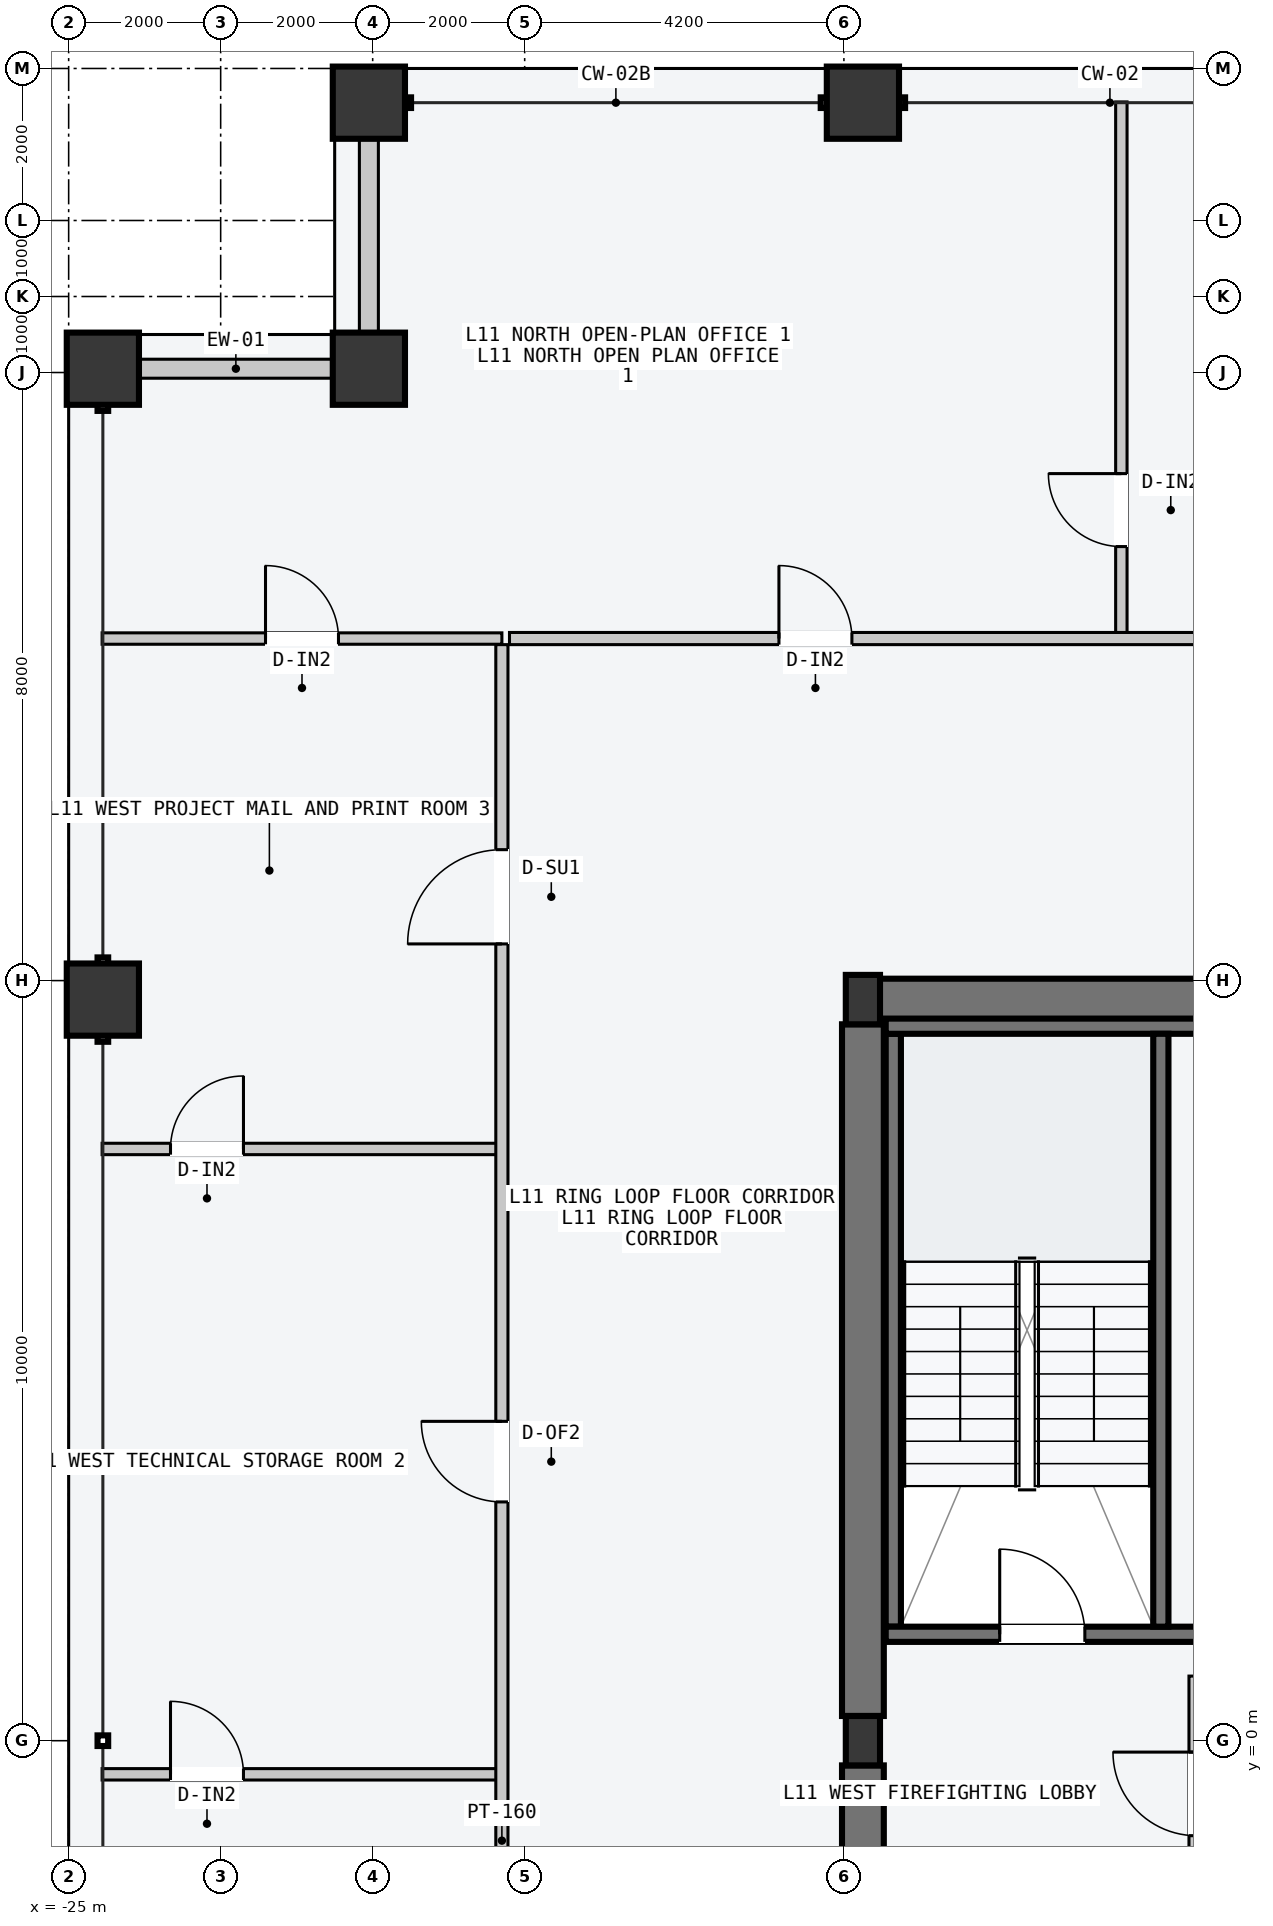
"""IFC4 building model, lengths in metres.
Left out: names, types, materials, properties, quantities, classifications, styles, units other than length and angle.
Written with IfcOpenShell. Run it as: python <this file> out.ifc"""

import sys

from ifc_helpers import new_model, si_unit, direction, frame, frame_2d, origin, origin_2d, place, context, subcontext, project, spatial, rectangle, hollow_rectangle, i_section, extrude, element, fill, save


model = new_model("IFC4")
c1 = context("Model", 3, precision=1e-05, world=origin(), true_north=direction((0.0, 1.0)))
c2 = subcontext(c1, "Body", "Model", "MODEL_VIEW")
j1 = project(units=[si_unit("LENGTHUNIT", "METRE"), si_unit("PLANEANGLEUNIT", "RADIAN")], contexts=[c1])
p1 = place(None, origin())
s1 = spatial("IfcSite", under=j1, at=p1, CompositionType="ELEMENT")
p2 = place(p1, origin())
s2 = spatial("IfcBuilding", under=s1, at=p2, CompositionType="ELEMENT")
p3 = place(p2, frame((0.0, 0.0, 45.6)))
s3 = spatial("IfcBuildingStorey", under=s2, at=p3, CompositionType="ELEMENT", Elevation=45.6)
p4 = place(p3, frame((-14.53, 9.75, -0.2), z_axis=(0.0, 0.0, 1.0), x_axis=(1.0, 0.0, 0.0)))
e1 = element("IfcWall", 1, at=p4, inside=s3, PredefinedType="SHEAR", context=c2, shape_type="SweptSolid", body=[
    extrude(rectangle(XDim=6.46, YDim=0.55, at=frame_2d((3.23, 0.0))), origin(), (0.0, 0.0, 1.0), 3.6),
])
for number, where, z_axis, x_axis in (
    (2, (-14.55, -9.425, -0.2), (0.0, 0.0, 1.0), (0.0, 1.0, 0.0)),
    (3, (-14.55, 0.325, -0.2), (0.0, 0.0, 1.0), (0.0, 1.0, 0.0)),
):
    element("IfcWall", number, at=place(p3, frame(where, z_axis=z_axis, x_axis=x_axis)), inside=s3, PredefinedType="SHEAR", context=c2, shape_type="SweptSolid", body=[
        extrude(rectangle(XDim=9.1, YDim=0.55, at=frame_2d((4.55, 0.0))), origin(), (0.0, 0.0, 1.0), 3.6),
    ])
p5 = place(p3, frame((-14.15, 1.5, -0.2), z_axis=(0.0, 0.0, 1.0), x_axis=(0.0, 1.0, 0.0)))
e4 = element("IfcWall", 4, at=p5, inside=s3, PredefinedType="SOLIDWALL", context=c2, shape_type="SweptSolid", body=[
    extrude(rectangle(XDim=7.8, YDim=0.2, at=frame_2d((3.9, 0.0))), origin(), (0.0, 0.0, 1.0), 3.6),
])
p6 = place(p3, frame((-14.25, 1.4, -0.2), z_axis=(0.0, 0.0, 1.0), x_axis=(1.0, 0.0, 0.0)))
e5 = element("IfcWall", 5, at=p6, inside=s3, PredefinedType="SOLIDWALL", context=c2, shape_type="SweptSolid", body=[
    extrude(rectangle(XDim=4.1, YDim=0.2, at=frame_2d((2.05, 0.0))), origin(), (0.0, 0.0, 1.0), 3.6),
])
p7 = place(p6, frame((1.5, 0.0, 0.2)))
e6 = element("IfcOpeningElement", 6, at=p7, cuts=e5, PredefinedType="OPENING", context=c2, shape_type="SweptSolid", body=[
    extrude(rectangle(XDim=1.12, YDim=2.18, at=frame_2d((0.56, 1.09))), frame((0.0, 0.11, 0.0), z_axis=(0.0, -1.0, 0.0), x_axis=(1.0, 0.0, 0.0)), (0.0, 0.0, 1.0), 0.22),
])
p8 = place(p3, frame((-14.25, 9.4, -0.2), z_axis=(0.0, 0.0, 1.0), x_axis=(1.0, 0.0, 0.0)))
e7 = element("IfcWall", 7, at=p8, inside=s3, PredefinedType="SOLIDWALL", context=c2, shape_type="SweptSolid", body=[
    extrude(rectangle(XDim=4.1, YDim=0.2, at=frame_2d((2.05, 0.0))), origin(), (0.0, 0.0, 1.0), 3.6),
])
p9 = place(p3, frame((-10.63, 1.5, -0.2), z_axis=(0.0, 0.0, 1.0), x_axis=(0.0, 1.0, 0.0)))
e8 = element("IfcWall", 8, at=p9, inside=s3, PredefinedType="SOLIDWALL", context=c2, shape_type="SweptSolid", body=[
    extrude(rectangle(XDim=7.8, YDim=0.2, at=frame_2d((3.9, 0.0))), origin(), (0.0, 0.0, 1.0), 3.6),
])
for number, where, z_axis, x_axis in (
    (9, (-14.55, 0.0, 0.0), (0.0, 0.0, 1.0), (1.0, 0.0, 0.0)),
    (10, (-14.55, 9.75, 0.0), (0.0, 0.0, 1.0), (1.0, 0.0, 0.0)),
):
    element("IfcColumn", number, at=place(p3, frame(where, z_axis=z_axis, x_axis=x_axis)), inside=s3, PredefinedType="COLUMN", context=c2, shape_type="SweptSolid", body=[
        extrude(i_section(OverallWidth=0.45, OverallDepth=0.65, WebThickness=0.025, FlangeThickness=0.04, at=origin_2d()), origin(), (0.0, 0.0, 1.0), 3.6),
    ])
for number, where, z_axis, x_axis in (
    (11, (-21.05, 21.55, 0.0), (0.0, 0.0, 1.0), (1.0, 0.0, 0.0)),
    (12, (-14.55, 21.55, 0.0), (0.0, 0.0, 1.0), (1.0, 0.0, 0.0)),
    (13, (-24.55, 9.75, 0.0), (0.0, 0.0, 1.0), (0.0, 1.0, 0.0)),
    (14, (-24.55, 18.05, 0.0), (0.0, 0.0, 1.0), (0.0, 1.0, 0.0)),
    (15, (-21.05, 18.05, 0.0), (0.0, 0.0, 1.0), (1.0, 0.0, 0.0)),
):
    element("IfcColumn", number, at=place(p3, frame(where, z_axis=z_axis, x_axis=x_axis)), inside=s3, PredefinedType="COLUMN", context=c2, shape_type="SweptSolid", body=[
        extrude(hollow_rectangle(XDim=0.95, YDim=0.95, WallThickness=0.048, at=origin_2d()), origin(), (0.0, 0.0, 1.0), 3.6),
    ])
for number, where, z_axis, x_axis in (
    (16, (-24.065, 18.05, 0.0), (0.0, 0.0, 1.0), (1.0, 0.0, 0.0)),
    (17, (-21.05, 18.535, 0.0), (0.0, 0.0, 1.0), (0.0, 1.0, 0.0)),
):
    element("IfcWall", number, at=place(p3, frame(where, z_axis=z_axis, x_axis=x_axis)), inside=s3, PredefinedType="STANDARD", context=c2, shape_type="SweptSolid", body=[
        extrude(rectangle(XDim=2.53, YDim=0.25, at=frame_2d((1.265, 0.0))), origin(), (0.0, 0.0, 1.0), 2.7),
    ])
p10 = place(p3, frame((-10.16, -2.55, 0.0), z_axis=(0.0, 0.0, 1.0), x_axis=(0.0, 1.0, 0.0)))
e18 = element("IfcWall", 18, at=p10, inside=s3, PredefinedType="PARTITIONING", context=c2, shape_type="SweptSolid", body=[
    extrude(rectangle(XDim=3.4, YDim=0.2, at=frame_2d((1.7, 0.0))), origin(), (0.0, 0.0, 1.0), 3.4),
])
p11 = place(p10, frame((1.3, 0.0, 0.0)))
e19 = element("IfcOpeningElement", 19, at=p11, cuts=e18, PredefinedType="OPENING", context=c2, shape_type="SweptSolid", body=[
    extrude(rectangle(XDim=1.1, YDim=2.15, at=frame_2d((0.55, 1.075))), frame((0.0, 0.11, 0.0), z_axis=(0.0, -1.0, 0.0), x_axis=(1.0, 0.0, 0.0)), (0.0, 0.0, 1.0), 0.22),
])
p12 = place(p3, frame((-11.15, 14.56, 0.0), z_axis=(0.0, 0.0, 1.0), x_axis=(0.0, 1.0, 0.0)))
e20 = element("IfcWall", 20, at=p12, inside=s3, PredefinedType="PARTITIONING", context=c2, shape_type="SweptSolid", body=[
    extrude(rectangle(XDim=7.0, YDim=0.15, at=frame_2d((3.5, 0.0))), origin(), (0.0, 0.0, 1.0), 3.4),
])
p13 = place(p12, frame((1.15, 0.0, 0.0)))
e21 = element("IfcOpeningElement", 21, at=p13, cuts=e20, PredefinedType="OPENING", context=c2, shape_type="SweptSolid", body=[
    extrude(rectangle(XDim=0.96, YDim=2.18, at=frame_2d((0.48, 1.09))), frame((0.0, 0.085, 0.0), z_axis=(0.0, -1.0, 0.0), x_axis=(1.0, 0.0, 0.0)), (0.0, 0.0, 1.0), 0.17),
])
p14 = place(p3, frame((-19.2, 14.5, 0.0), z_axis=(0.0, 0.0, 1.0), x_axis=(1.0, 0.0, 0.0)))
e22 = element("IfcWall", 22, at=p14, inside=s3, PredefinedType="PARTITIONING", context=c2, shape_type="SweptSolid", body=[
    extrude(rectangle(XDim=38.4, YDim=0.16, at=frame_2d((19.2, 0.0))), origin(), (0.0, 0.0, 1.0), 3.4),
])
p15 = place(p14, frame((3.545, 0.0, 0.0)))
e23 = element("IfcOpeningElement", 23, at=p15, cuts=e22, PredefinedType="OPENING", context=c2, shape_type="SweptSolid", body=[
    extrude(rectangle(XDim=0.96, YDim=2.18, at=frame_2d((0.48, 1.09))), frame((0.0, 0.09, 0.0), z_axis=(0.0, -1.0, 0.0), x_axis=(1.0, 0.0, 0.0)), (0.0, 0.0, 1.0), 0.18),
])
p16 = place(p14, frame((14.111, 0.0, 0.0)))
e24 = element("IfcOpeningElement", 24, at=p16, cuts=e22, PredefinedType="OPENING", context=c2, shape_type="SweptSolid", body=[
    extrude(rectangle(XDim=1.02, YDim=2.2, at=frame_2d((0.51, 1.1))), frame((0.0, 0.09, 0.0), z_axis=(0.0, -1.0, 0.0), x_axis=(1.0, 0.0, 0.0)), (0.0, 0.0, 1.0), 0.18),
])
p17 = place(p14, frame((24.631, 0.0, 0.0)))
e25 = element("IfcOpeningElement", 25, at=p17, cuts=e22, PredefinedType="OPENING", context=c2, shape_type="SweptSolid", body=[
    extrude(rectangle(XDim=1.06, YDim=2.2, at=frame_2d((0.53, 1.1))), frame((0.0, 0.09, 0.0), z_axis=(0.0, -1.0, 0.0), x_axis=(1.0, 0.0, 0.0)), (0.0, 0.0, 1.0), 0.18),
])
p18 = place(p14, frame((33.145, 0.0, 0.0)))
e26 = element("IfcOpeningElement", 26, at=p18, cuts=e22, PredefinedType="OPENING", context=c2, shape_type="SweptSolid", body=[
    extrude(rectangle(XDim=1.24, YDim=2.24, at=frame_2d((0.62, 1.12))), frame((0.0, 0.09, 0.0), z_axis=(0.0, -1.0, 0.0), x_axis=(1.0, 0.0, 0.0)), (0.0, 0.0, 1.0), 0.18),
])
p19 = place(p3, frame((-24.56, 14.5, 0.0), z_axis=(0.0, 0.0, 1.0), x_axis=(1.0, 0.0, 0.0)))
e27 = element("IfcWall", 27, at=p19, inside=s3, PredefinedType="PARTITIONING", context=c2, shape_type="SweptSolid", body=[
    extrude(rectangle(XDim=5.26, YDim=0.15, at=frame_2d((2.63, 0.0))), origin(), (0.0, 0.0, 1.0), 3.4),
])
p20 = place(p19, frame((2.15, 0.0, 0.0)))
e28 = element("IfcOpeningElement", 28, at=p20, cuts=e27, PredefinedType="OPENING", context=c2, shape_type="SweptSolid", body=[
    extrude(rectangle(XDim=0.96, YDim=2.18, at=frame_2d((0.48, 1.09))), frame((0.0, 0.085, 0.0), z_axis=(0.0, -1.0, 0.0), x_axis=(1.0, 0.0, 0.0)), (0.0, 0.0, 1.0), 0.17),
])
p21 = place(p3, frame((-24.56, -0.442, 0.0), z_axis=(0.0, 0.0, 1.0), x_axis=(1.0, 0.0, 0.0)))
e29 = element("IfcWall", 29, at=p21, inside=s3, PredefinedType="PARTITIONING", context=c2, shape_type="SweptSolid", body=[
    extrude(rectangle(XDim=5.2, YDim=0.15, at=frame_2d((2.6, 0.0))), origin(), (0.0, 0.0, 1.0), 3.4),
])
p22 = place(p21, frame((0.9, 0.0, 0.0)))
e30 = element("IfcOpeningElement", 30, at=p22, cuts=e29, PredefinedType="OPENING", context=c2, shape_type="SweptSolid", body=[
    extrude(rectangle(XDim=0.96, YDim=2.18, at=frame_2d((0.48, 1.09))), frame((0.0, 0.085, 0.0), z_axis=(0.0, -1.0, 0.0), x_axis=(1.0, 0.0, 0.0)), (0.0, 0.0, 1.0), 0.17),
])
p23 = place(p3, frame((-24.56, 7.785, 0.0), z_axis=(0.0, 0.0, 1.0), x_axis=(1.0, 0.0, 0.0)))
e31 = element("IfcWall", 31, at=p23, inside=s3, PredefinedType="PARTITIONING", context=c2, shape_type="SweptSolid", body=[
    extrude(rectangle(XDim=5.2, YDim=0.15, at=frame_2d((2.6, 0.0))), origin(), (0.0, 0.0, 1.0), 3.4),
])
p24 = place(p23, frame((0.9, 0.0, 0.0)))
e32 = element("IfcOpeningElement", 32, at=p24, cuts=e31, PredefinedType="OPENING", context=c2, shape_type="SweptSolid", body=[
    extrude(rectangle(XDim=0.96, YDim=2.18, at=frame_2d((0.48, 1.09))), frame((0.0, 0.085, 0.0), z_axis=(0.0, -1.0, 0.0), x_axis=(1.0, 0.0, 0.0)), (0.0, 0.0, 1.0), 0.17),
])
p25 = place(p3, frame((-19.3, -12.12, 0.0), z_axis=(0.0, 0.0, 1.0), x_axis=(0.0, 1.0, 0.0)))
e33 = element("IfcWall", 33, at=p25, inside=s3, PredefinedType="PARTITIONING", context=c2, shape_type="SweptSolid", body=[
    extrude(rectangle(XDim=26.54, YDim=0.16, at=frame_2d((13.27, 0.0))), origin(), (0.0, 0.0, 1.0), 3.4),
])
p26 = place(p25, frame((5.329, 0.0, 0.0)))
e34 = element("IfcOpeningElement", 34, at=p26, cuts=e33, PredefinedType="OPENING", context=c2, shape_type="SweptSolid", body=[
    extrude(rectangle(XDim=1.02, YDim=2.2, at=frame_2d((0.51, 1.1))), frame((0.0, 0.09, 0.0), z_axis=(0.0, -1.0, 0.0), x_axis=(1.0, 0.0, 0.0)), (0.0, 0.0, 1.0), 0.18),
])
p27 = place(p25, frame((15.261, 0.0, 0.0)))
e35 = element("IfcOpeningElement", 35, at=p27, cuts=e33, PredefinedType="OPENING", context=c2, shape_type="SweptSolid", body=[
    extrude(rectangle(XDim=1.06, YDim=2.2, at=frame_2d((0.53, 1.1))), frame((0.0, 0.09, 0.0), z_axis=(0.0, -1.0, 0.0), x_axis=(1.0, 0.0, 0.0)), (0.0, 0.0, 1.0), 0.18),
])
p28 = place(p25, frame((22.603, 0.0, 0.0)))
e36 = element("IfcOpeningElement", 36, at=p28, cuts=e33, PredefinedType="OPENING", context=c2, shape_type="SweptSolid", body=[
    extrude(rectangle(XDim=1.24, YDim=2.24, at=frame_2d((0.62, 1.12))), frame((0.0, 0.09, 0.0), z_axis=(0.0, -1.0, 0.0), x_axis=(1.0, 0.0, 0.0)), (0.0, 0.0, 1.0), 0.18),
])
p29 = place(p7, origin())
e37 = element("IfcDoor", 37, at=p29, inside=s3, OperationType="SINGLE_SWING_LEFT", PredefinedType="DOOR", context=c2, shape_type="SweptSolid", body=[
    extrude(rectangle(XDim=1.12, YDim=2.18, at=frame_2d((0.56, 1.09))), frame((0.0, 0.025, 0.0), z_axis=(0.0, -1.0, 0.0), x_axis=(1.0, 0.0, 0.0)), (0.0, 0.0, 1.0), 0.05),
])
fill(e6, e37)
p30 = place(p13, origin())
e38 = element("IfcDoor", 38, at=p30, inside=s3, OperationType="SINGLE_SWING_RIGHT", PredefinedType="DOOR", context=c2, shape_type="SweptSolid", body=[
    extrude(rectangle(XDim=0.96, YDim=2.18, at=frame_2d((0.48, 1.09))), frame((0.0, 0.025, 0.0), z_axis=(0.0, -1.0, 0.0), x_axis=(1.0, 0.0, 0.0)), (0.0, 0.0, 1.0), 0.05),
])
fill(e21, e38)
p31 = place(p15, origin())
e39 = element("IfcDoor", 39, at=p31, inside=s3, OperationType="SINGLE_SWING_LEFT", PredefinedType="DOOR", context=c2, shape_type="SweptSolid", body=[
    extrude(rectangle(XDim=0.96, YDim=2.18, at=frame_2d((0.48, 1.09))), frame((0.0, 0.025, 0.0), z_axis=(0.0, -1.0, 0.0), x_axis=(1.0, 0.0, 0.0)), (0.0, 0.0, 1.0), 0.05),
])
fill(e23, e39)
p32 = place(p20, origin())
e40 = element("IfcDoor", 40, at=p32, inside=s3, OperationType="SINGLE_SWING_LEFT", PredefinedType="DOOR", context=c2, shape_type="SweptSolid", body=[
    extrude(rectangle(XDim=0.96, YDim=2.18, at=frame_2d((0.48, 1.09))), frame((0.0, 0.025, 0.0), z_axis=(0.0, -1.0, 0.0), x_axis=(1.0, 0.0, 0.0)), (0.0, 0.0, 1.0), 0.05),
])
fill(e28, e40)
p33 = place(p22, origin())
e41 = element("IfcDoor", 41, at=p33, inside=s3, OperationType="SINGLE_SWING_LEFT", PredefinedType="DOOR", context=c2, shape_type="SweptSolid", body=[
    extrude(rectangle(XDim=0.96, YDim=2.18, at=frame_2d((0.48, 1.09))), frame((0.0, 0.025, 0.0), z_axis=(0.0, -1.0, 0.0), x_axis=(1.0, 0.0, 0.0)), (0.0, 0.0, 1.0), 0.05),
])
fill(e30, e41)
p34 = place(p24, origin())
e42 = element("IfcDoor", 42, at=p34, inside=s3, OperationType="SINGLE_SWING_RIGHT", PredefinedType="DOOR", context=c2, shape_type="SweptSolid", body=[
    extrude(rectangle(XDim=0.96, YDim=2.18, at=frame_2d((0.48, 1.09))), frame((0.0, 0.025, 0.0), z_axis=(0.0, -1.0, 0.0), x_axis=(1.0, 0.0, 0.0)), (0.0, 0.0, 1.0), 0.05),
])
fill(e32, e42)
p35 = place(p27, origin())
e43 = element("IfcDoor", 43, at=p35, inside=s3, OperationType="SINGLE_SWING_RIGHT", PredefinedType="DOOR", context=c2, shape_type="SweptSolid", body=[
    extrude(rectangle(XDim=1.06, YDim=2.2, at=frame_2d((0.53, 1.1))), frame((0.0, 0.025, 0.0), z_axis=(0.0, -1.0, 0.0), x_axis=(1.0, 0.0, 0.0)), (0.0, 0.0, 1.0), 0.05),
])
fill(e35, e43)
p36 = place(p28, origin())
e44 = element("IfcDoor", 44, at=p36, inside=s3, OperationType="SINGLE_SWING_LEFT", PredefinedType="DOOR", context=c2, shape_type="SweptSolid", body=[
    extrude(rectangle(XDim=1.24, YDim=2.24, at=frame_2d((0.62, 1.12))), frame((0.0, 0.025, 0.0), z_axis=(0.0, -1.0, 0.0), x_axis=(1.0, 0.0, 0.0)), (0.0, 0.0, 1.0), 0.05),
])
fill(e36, e44)
save(model, sys.argv[1])
